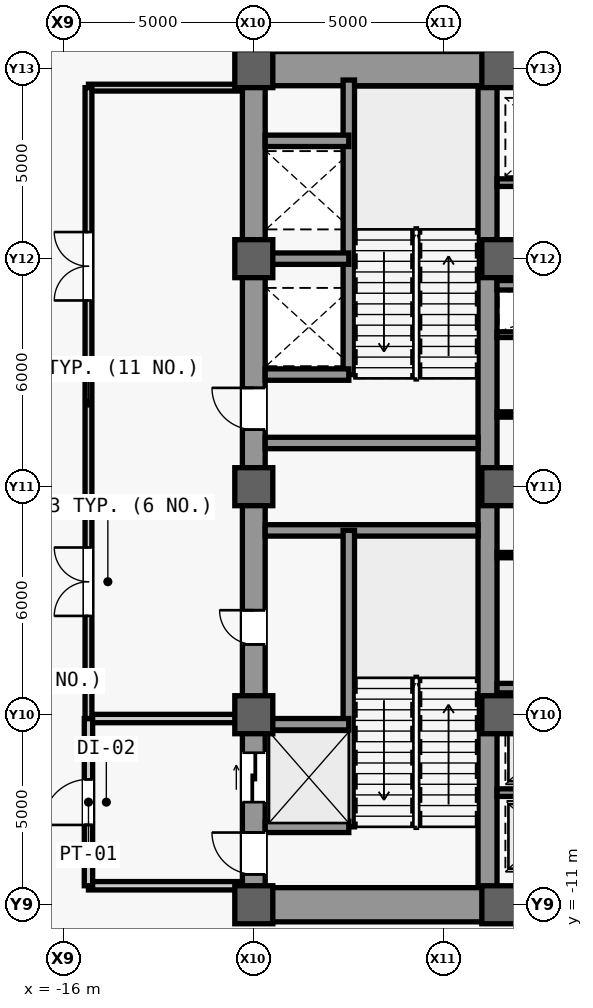
"""IFC4 building model, lengths in metres.
Left out: names, types, materials, properties, quantities, classifications, styles, units other than length and angle.
Written with IfcOpenShell. Run it as: python <this file> out.ifc"""

import sys

from ifc_helpers import new_model, si_unit, direction, frame, frame_2d, origin, origin_2d, place, context, subcontext, project, spatial, rectangle, extrude, source, transform, mapped, element, fill, save


model = new_model("IFC4")
c1 = context("Model", 3, precision=1e-05, world=origin(), true_north=direction((0.0, 1.0)))
c2 = subcontext(c1, "Body", "Model", "MODEL_VIEW")
j1 = project(units=[si_unit("LENGTHUNIT", "METRE"), si_unit("PLANEANGLEUNIT", "RADIAN")], contexts=[c1])
p1 = place(None, origin())
s1 = spatial("IfcSite", under=j1, at=p1, CompositionType="ELEMENT")
p2 = place(p1, origin())
s2 = spatial("IfcBuilding", under=s1, at=p2, CompositionType="ELEMENT")
p3 = place(p2, frame((0.0, 0.0, 12.0)))
s3 = spatial("IfcBuildingStorey", under=s2, at=p3, CompositionType="ELEMENT", Elevation=12.0)
m1 = source(origin(), c2, "Body", "SweptSolid", [
    extrude(rectangle(XDim=22.0, YDim=0.6, at=frame_2d((11.0, 0.0))), origin(), (0.0, 0.0, 1.0), 5.08),
])
p4 = place(p3, frame((-11.0, -11.0, 0.0), z_axis=(0.0, 0.0, 1.0), x_axis=(0.0, 1.0, 0.0)))
e1 = element("IfcWall", 1, at=p4, inside=s3, PredefinedType="SHEAR", context=c2, shape_type="MappedRepresentation", body=[
    mapped(m1, transform((0.0, 0.0, 0.0), scale=1.0)),
])
m2 = source(origin(), c2, "Body", "SweptSolid", [
    extrude(rectangle(XDim=1.1, YDim=2.2, at=frame_2d((0.55, 1.1))), frame((0.0, 0.31, 0.0), z_axis=(0.0, -1.0, 0.0), x_axis=(1.0, 0.0, 0.0)), (0.0, 0.0, 1.0), 0.62),
])
p5 = place(p4, frame((0.8, 0.0, 0.0)))
e2 = element("IfcOpeningElement", 2, at=p5, cuts=e1, PredefinedType="OPENING", context=c2, shape_type="MappedRepresentation", body=[
    mapped(m2, transform((0.0, 0.0, 0.0), scale=1.0)),
])
p6 = place(p4, frame((12.5, 0.0, 0.0)))
e3 = element("IfcOpeningElement", 3, at=p6, cuts=e1, PredefinedType="OPENING", context=c2, shape_type="MappedRepresentation", body=[
    mapped(m2, transform((0.0, 0.0, 0.0), scale=1.0)),
])
m3 = source(origin(), c2, "Body", "SweptSolid", [
    extrude(rectangle(XDim=0.9, YDim=2.15, at=frame_2d((0.45, 1.075))), frame((0.0, 0.31, 0.0), z_axis=(0.0, -1.0, 0.0), x_axis=(1.0, 0.0, 0.0)), (0.0, 0.0, 1.0), 0.62),
])
p7 = place(p4, frame((6.85, 0.0, 0.0)))
e4 = element("IfcOpeningElement", 4, at=p7, cuts=e1, PredefinedType="OPENING", context=c2, shape_type="MappedRepresentation", body=[
    mapped(m3, transform((0.0, 0.0, 0.0), scale=1.0)),
])
m4 = source(origin(), c2, "Body", "SweptSolid", [
    extrude(rectangle(XDim=1.3, YDim=2.3, at=frame_2d((0.65, 1.15))), frame((0.0, 0.31, 0.0), z_axis=(0.0, -1.0, 0.0), x_axis=(1.0, 0.0, 0.0)), (0.0, 0.0, 1.0), 0.62),
])
p8 = place(p4, frame((2.7, 0.0, 0.0)))
e5 = element("IfcOpeningElement", 5, at=p8, cuts=e1, PredefinedType="OPENING", context=c2, shape_type="MappedRepresentation", body=[
    mapped(m4, transform((0.0, 0.0, 0.0), scale=1.0)),
])
m5 = source(origin(), c2, "Body", "SweptSolid", [
    extrude(rectangle(XDim=21.4, YDim=0.5, at=frame_2d((10.7, 0.0))), origin(), (0.0, 0.0, 1.0), 5.08),
])
p9 = place(p3, frame((-4.85, -10.7, 0.0), z_axis=(0.0, 0.0, 1.0), x_axis=(0.0, 1.0, 0.0)))
e6 = element("IfcWall", 6, at=p9, inside=s3, PredefinedType="SHEAR", context=c2, shape_type="MappedRepresentation", body=[
    mapped(m5, transform((0.0, 0.0, 0.0), scale=1.0)),
])
m6 = source(origin(), c2, "Body", "SweptSolid", [
    extrude(rectangle(XDim=5.85, YDim=0.9, at=frame_2d((2.925, 0.0))), origin(), (0.0, 0.0, 1.0), 5.08),
])
for number, where, z_axis, x_axis in (
    (7, (-10.7, -11.0, 0.0), (0.0, 0.0, 1.0), (1.0, 0.0, 0.0)),
    (8, (-10.7, 11.0, 0.0), (0.0, 0.0, 1.0), (1.0, 0.0, 0.0)),
):
    element("IfcWall", number, at=place(p3, frame(where, z_axis=z_axis, x_axis=x_axis)), inside=s3, PredefinedType="SHEAR", context=c2, shape_type="MappedRepresentation", body=[
        mapped(m6, transform((0.0, 0.0, 0.0), scale=1.0)),
    ])
m7 = source(origin(), c2, "Body", "SweptSolid", [
    extrude(rectangle(XDim=5.6, YDim=0.3, at=frame_2d((2.8, 0.0))), origin(), (0.0, 0.0, 1.0), 5.08),
])
for number, where, z_axis, x_axis in (
    (9, (-10.7, -1.15, 0.0), (0.0, 0.0, 1.0), (1.0, 0.0, 0.0)),
    (10, (-10.7, 1.15, 0.0), (0.0, 0.0, 1.0), (1.0, 0.0, 0.0)),
):
    element("IfcWall", number, at=place(p3, frame(where, z_axis=z_axis, x_axis=x_axis)), inside=s3, PredefinedType="SHEAR", context=c2, shape_type="MappedRepresentation", body=[
        mapped(m7, transform((0.0, 0.0, 0.0), scale=1.0)),
    ])
m8 = source(origin(), c2, "Body", "SweptSolid", [
    extrude(rectangle(XDim=9.2, YDim=0.5, at=frame_2d((4.6, 0.0))), origin(), (0.0, 0.0, 1.0), 5.08),
])
p10 = place(p3, frame((-4.6, -11.0, 0.0), z_axis=(0.0, 0.0, 1.0), x_axis=(1.0, 0.0, 0.0)))
e11 = element("IfcWall", 11, at=p10, inside=s3, PredefinedType="SHEAR", context=c2, shape_type="MappedRepresentation", body=[
    mapped(m8, transform((0.0, 0.0, 0.0), scale=1.0)),
])
m9 = source(origin(), c2, "Body", "SweptSolid", [
    extrude(rectangle(XDim=1.8, YDim=2.25, at=frame_2d((0.9, 1.125))), frame((0.0, 0.26, 0.0), z_axis=(0.0, -1.0, 0.0), x_axis=(1.0, 0.0, 0.0)), (0.0, 0.0, 1.0), 0.52),
])
p11 = place(p10, frame((3.7, 0.0, 0.0)))
e12 = element("IfcOpeningElement", 12, at=p11, cuts=e11, PredefinedType="OPENING", context=c2, shape_type="MappedRepresentation", body=[
    mapped(m9, transform((0.0, 0.0, 0.0), scale=1.0)),
])
p12 = place(p3, frame((-4.6, 11.0, 0.0), z_axis=(0.0, 0.0, 1.0), x_axis=(1.0, 0.0, 0.0)))
e13 = element("IfcWall", 13, at=p12, inside=s3, PredefinedType="SHEAR", context=c2, shape_type="MappedRepresentation", body=[
    mapped(m8, transform((0.0, 0.0, 0.0), scale=1.0)),
])
p13 = place(p12, frame((3.7, 0.0, 0.0)))
e14 = element("IfcOpeningElement", 14, at=p13, cuts=e13, PredefinedType="OPENING", context=c2, shape_type="MappedRepresentation", body=[
    mapped(m9, transform((0.0, 0.0, 0.0), scale=1.0)),
])
m10 = source(origin(), c2, "Body", "SweptSolid", [
    extrude(rectangle(XDim=1.0, YDim=1.0, at=origin_2d()), origin(), (0.0, 0.0, 1.0), 5.4),
])
for number, where, z_axis, x_axis in (
    (15, (-11.0, -11.0, 0.0), (0.0, 0.0, 1.0), (1.0, 0.0, 0.0)),
    (16, (-11.0, -6.0, 0.0), (0.0, 0.0, 1.0), (1.0, 0.0, 0.0)),
    (17, (-11.0, 0.0, 0.0), (0.0, 0.0, 1.0), (1.0, 0.0, 0.0)),
    (18, (-11.0, 6.0, 0.0), (0.0, 0.0, 1.0), (1.0, 0.0, 0.0)),
    (19, (-11.0, 11.0, 0.0), (0.0, 0.0, 1.0), (1.0, 0.0, 0.0)),
    (20, (-4.5, -11.0, 0.0), (0.0, 0.0, 1.0), (1.0, 0.0, 0.0)),
    (21, (-4.5, -6.0, 0.0), (0.0, 0.0, 1.0), (1.0, 0.0, 0.0)),
    (22, (-4.5, 0.0, 0.0), (0.0, 0.0, 1.0), (1.0, 0.0, 0.0)),
    (23, (-4.5, 6.0, 0.0), (0.0, 0.0, 1.0), (1.0, 0.0, 0.0)),
    (24, (-4.5, 11.0, 0.0), (0.0, 0.0, 1.0), (1.0, 0.0, 0.0)),
):
    element("IfcColumn", number, at=place(p3, frame(where, z_axis=z_axis, x_axis=x_axis)), inside=s3, PredefinedType="COLUMN", context=c2, shape_type="MappedRepresentation", body=[
        mapped(m10, transform((0.0, 0.0, 0.0), scale=1.0)),
    ])
m11 = source(origin(), c2, "Body", "SweptSolid", [
    extrude(rectangle(XDim=7.8, YDim=0.3, at=frame_2d((3.9, 0.0))), origin(), (0.0, 0.0, 1.0), 5.08),
])
p14 = place(p3, frame((-8.5, -8.95, 0.0), z_axis=(0.0, 0.0, 1.0), x_axis=(0.0, 1.0, 0.0)))
e25 = element("IfcWall", 25, at=p14, inside=s3, PredefinedType="SHEAR", context=c2, shape_type="MappedRepresentation", body=[
    mapped(m11, transform((0.0, 0.0, 0.0), scale=1.0)),
])
m12 = source(origin(), c2, "Body", "SweptSolid", [
    extrude(rectangle(XDim=2.2, YDim=0.3, at=frame_2d((1.1, 0.0))), origin(), (0.0, 0.0, 1.0), 5.08),
])
for number, where, z_axis, x_axis in (
    (26, (-10.7, -8.95, 0.0), (0.0, 0.0, 1.0), (1.0, 0.0, 0.0)),
    (27, (-10.7, -6.25, 0.0), (0.0, 0.0, 1.0), (1.0, 0.0, 0.0)),
):
    element("IfcWall", number, at=place(p3, frame(where, z_axis=z_axis, x_axis=x_axis)), inside=s3, PredefinedType="SHEAR", context=c2, shape_type="MappedRepresentation", body=[
        mapped(m12, transform((0.0, 0.0, 0.0), scale=1.0)),
    ])
m13 = source(origin(), c2, "Body", "SweptSolid", [
    extrude(rectangle(XDim=7.75, YDim=0.3, at=frame_2d((3.875, 0.0))), origin(), (0.0, 0.0, 1.0), 5.08),
])
p15 = place(p3, frame((-8.5, 2.95, 0.0), z_axis=(0.0, 0.0, 1.0), x_axis=(0.0, 1.0, 0.0)))
e28 = element("IfcWall", 28, at=p15, inside=s3, PredefinedType="SHEAR", context=c2, shape_type="MappedRepresentation", body=[
    mapped(m13, transform((0.0, 0.0, 0.0), scale=1.0)),
])
for number, where, z_axis, x_axis in (
    (29, (-10.7, 2.95, 0.0), (0.0, 0.0, 1.0), (1.0, 0.0, 0.0)),
    (30, (-10.7, 6.0, 0.0), (0.0, 0.0, 1.0), (1.0, 0.0, 0.0)),
    (31, (-10.7, 9.1, 0.0), (0.0, 0.0, 1.0), (1.0, 0.0, 0.0)),
):
    element("IfcWall", number, at=place(p3, frame(where, z_axis=z_axis, x_axis=x_axis)), inside=s3, PredefinedType="SHEAR", context=c2, shape_type="MappedRepresentation", body=[
        mapped(m12, transform((0.0, 0.0, 0.0), scale=1.0)),
    ])
m14 = source(origin(), c2, "Body", "SweptSolid", [
    extrude(rectangle(XDim=4.05, YDim=0.22, at=frame_2d((2.025, 0.0))), origin(), (0.0, 0.0, 1.0), 5.08),
])
for number, where, z_axis, x_axis in (
    (32, (-15.35, -10.5, 0.0), (0.0, 0.0, 1.0), (1.0, 0.0, 0.0)),
    (33, (-15.35, -6.1, 0.0), (0.0, 0.0, 1.0), (1.0, 0.0, 0.0)),
):
    element("IfcWall", number, at=place(p3, frame(where, z_axis=z_axis, x_axis=x_axis)), inside=s3, PredefinedType="PARTITIONING", context=c2, shape_type="MappedRepresentation", body=[
        mapped(m14, transform((0.0, 0.0, 0.0), scale=1.0)),
    ])
m15 = source(origin(), c2, "Body", "SweptSolid", [
    extrude(rectangle(XDim=4.4, YDim=0.22, at=frame_2d((2.2, 0.0))), origin(), (0.0, 0.0, 1.0), 5.08),
])
p16 = place(p3, frame((-15.35, -10.5, 0.0), z_axis=(0.0, 0.0, 1.0), x_axis=(0.0, 1.0, 0.0)))
e34 = element("IfcWall", 34, at=p16, inside=s3, PredefinedType="PARTITIONING", context=c2, shape_type="MappedRepresentation", body=[
    mapped(m15, transform((0.0, 0.0, 0.0), scale=1.0)),
])
m16 = source(origin(), c2, "Body", "SweptSolid", [
    extrude(rectangle(XDim=1.2, YDim=2.2, at=frame_2d((0.6, 1.1))), frame((0.0, 0.12, 0.0), z_axis=(0.0, -1.0, 0.0), x_axis=(1.0, 0.0, 0.0)), (0.0, 0.0, 1.0), 0.24),
])
p17 = place(p16, frame((1.6, 0.0, 0.0)))
e35 = element("IfcOpeningElement", 35, at=p17, cuts=e34, PredefinedType="OPENING", context=c2, shape_type="MappedRepresentation", body=[
    mapped(m16, transform((0.0, 0.0, 0.0), scale=1.0)),
])
m17 = source(origin(), c2, "Body", "SweptSolid", [
    extrude(rectangle(XDim=4.05, YDim=0.18, at=frame_2d((2.025, 0.0))), origin(), (0.0, 0.0, 1.0), 5.08),
])
p18 = place(p3, frame((-15.35, 10.5, 0.0), z_axis=(0.0, 0.0, 1.0), x_axis=(1.0, 0.0, 0.0)))
e36 = element("IfcWall", 36, at=p18, inside=s3, PredefinedType="PARTITIONING", context=c2, shape_type="MappedRepresentation", body=[
    mapped(m17, transform((0.0, 0.0, 0.0), scale=1.0)),
])
m18 = source(origin(), c2, "Body", "SweptSolid", [
    extrude(rectangle(XDim=16.6, YDim=0.18, at=frame_2d((8.3, 0.0))), origin(), (0.0, 0.0, 1.0), 5.08),
])
p19 = place(p3, frame((-15.35, -6.1, 0.0), z_axis=(0.0, 0.0, 1.0), x_axis=(0.0, 1.0, 0.0)))
e37 = element("IfcWall", 37, at=p19, inside=s3, PredefinedType="PARTITIONING", context=c2, shape_type="MappedRepresentation", body=[
    mapped(m18, transform((0.0, 0.0, 0.0), scale=1.0)),
])
m19 = source(origin(), c2, "Body", "SweptSolid", [
    extrude(rectangle(XDim=1.8, YDim=2.25, at=frame_2d((0.9, 1.125))), frame((0.0, 0.1, 0.0), z_axis=(0.0, -1.0, 0.0), x_axis=(1.0, 0.0, 0.0)), (0.0, 0.0, 1.0), 0.2),
])
p20 = place(p19, frame((2.7, 0.0, 0.0)))
e38 = element("IfcOpeningElement", 38, at=p20, cuts=e37, PredefinedType="OPENING", context=c2, shape_type="MappedRepresentation", body=[
    mapped(m19, transform((0.0, 0.0, 0.0), scale=1.0)),
])
p21 = place(p19, frame((11.0, 0.0, 0.0)))
e39 = element("IfcOpeningElement", 39, at=p21, cuts=e37, PredefinedType="OPENING", context=c2, shape_type="MappedRepresentation", body=[
    mapped(m19, transform((0.0, 0.0, 0.0), scale=1.0)),
])
m20 = source(origin(), c2, "Body", "SweptSolid", [
    extrude(rectangle(XDim=3.45, YDim=0.15, at=frame_2d((1.725, 0.0))), origin(), (0.0, 0.0, 1.0), 5.08),
])
p22 = place(p3, frame((-4.6, 4.0, 0.0), z_axis=(0.0, 0.0, 1.0), x_axis=(1.0, 0.0, 0.0)))
e40 = element("IfcWall", 40, at=p22, inside=s3, PredefinedType="PARTITIONING", context=c2, shape_type="MappedRepresentation", body=[
    mapped(m20, transform((0.0, 0.0, 0.0), scale=1.0)),
])
m21 = source(origin(), c2, "Body", "SweptSolid", [
    extrude(rectangle(XDim=2.45, YDim=0.2, at=frame_2d((1.225, 0.0))), origin(), (0.0, 0.0, 1.0), 5.08),
])
p23 = place(p3, frame((-4.6, -8.05, 0.0), z_axis=(0.0, 0.0, 1.0), x_axis=(1.0, 0.0, 0.0)))
e41 = element("IfcWall", 41, at=p23, inside=s3, PredefinedType="SHEAR", context=c2, shape_type="MappedRepresentation", body=[
    mapped(m21, transform((0.0, 0.0, 0.0), scale=1.0)),
])
m22 = source(origin(), c2, "Body", "SweptSolid", [
    extrude(rectangle(XDim=9.2, YDim=0.25, at=frame_2d((4.6, 0.0))), origin(), (0.0, 0.0, 1.0), 5.08),
])
p24 = place(p3, frame((-4.6, -5.3, 0.0), z_axis=(0.0, 0.0, 1.0), x_axis=(1.0, 0.0, 0.0)))
e42 = element("IfcWall", 42, at=p24, inside=s3, PredefinedType="SHEAR", context=c2, shape_type="MappedRepresentation", body=[
    mapped(m22, transform((0.0, 0.0, 0.0), scale=1.0)),
])
m23 = source(origin(), c2, "Body", "SweptSolid", [
    extrude(rectangle(XDim=1.05, YDim=2.2, at=frame_2d((0.525, 1.1))), frame((0.0, 0.135, 0.0), z_axis=(0.0, -1.0, 0.0), x_axis=(1.0, 0.0, 0.0)), (0.0, 0.0, 1.0), 0.27),
])
p25 = place(p24, frame((4.075, 0.0, 0.0)))
e43 = element("IfcOpeningElement", 43, at=p25, cuts=e42, PredefinedType="OPENING", context=c2, shape_type="MappedRepresentation", body=[
    mapped(m23, transform((0.0, 0.0, 0.0), scale=1.0)),
])
p26 = place(p3, frame((-4.6, 8.0, 0.0), z_axis=(0.0, 0.0, 1.0), x_axis=(1.0, 0.0, 0.0)))
e44 = element("IfcWall", 44, at=p26, inside=s3, PredefinedType="SHEAR", context=c2, shape_type="MappedRepresentation", body=[
    mapped(m21, transform((0.0, 0.0, 0.0), scale=1.0)),
])
p27 = place(p3, frame((-4.6, 5.3, 0.0), z_axis=(0.0, 0.0, 1.0), x_axis=(1.0, 0.0, 0.0)))
e45 = element("IfcWall", 45, at=p27, inside=s3, PredefinedType="SHEAR", context=c2, shape_type="MappedRepresentation", body=[
    mapped(m22, transform((0.0, 0.0, 0.0), scale=1.0)),
])
p28 = place(p27, frame((4.075, 0.0, 0.0)))
e46 = element("IfcOpeningElement", 46, at=p28, cuts=e45, PredefinedType="OPENING", context=c2, shape_type="MappedRepresentation", body=[
    mapped(m23, transform((0.0, 0.0, 0.0), scale=1.0)),
])
m24 = source(origin(), c2, "Body", "SweptSolid", [
    extrude(rectangle(XDim=3.45, YDim=0.14, at=frame_2d((1.725, 0.0))), origin(), (0.0, 0.0, 1.0), 5.08),
])
for number, where, z_axis, x_axis in (
    (47, (-4.6, -1.8, 0.0), (0.0, 0.0, 1.0), (1.0, 0.0, 0.0)),
    (48, (-4.6, 1.9, 0.0), (0.0, 0.0, 1.0), (1.0, 0.0, 0.0)),
):
    element("IfcWall", number, at=place(p3, frame(where, z_axis=z_axis, x_axis=x_axis)), inside=s3, PredefinedType="PARTITIONING", context=c2, shape_type="MappedRepresentation", body=[
        mapped(m24, transform((0.0, 0.0, 0.0), scale=1.0)),
    ])
m25 = source(origin(), c2, "Body", "SweptSolid", [
    extrude(rectangle(XDim=1.1, YDim=2.2, at=frame_2d((0.55, 1.1))), frame((0.0, 0.025, 0.0), z_axis=(0.0, -1.0, 0.0), x_axis=(1.0, 0.0, 0.0)), (0.0, 0.0, 1.0), 0.05),
])
p29 = place(p5, origin())
e49 = element("IfcDoor", 49, at=p29, inside=s3, OperationType="SINGLE_SWING_RIGHT", PredefinedType="DOOR", context=c2, shape_type="MappedRepresentation", body=[
    mapped(m25, transform((0.0, 0.0, 0.0), scale=1.0)),
])
fill(e2, e49)
p30 = place(p6, origin())
e50 = element("IfcDoor", 50, at=p30, inside=s3, OperationType="SINGLE_SWING_RIGHT", PredefinedType="DOOR", context=c2, shape_type="MappedRepresentation", body=[
    mapped(m25, transform((0.0, 0.0, 0.0), scale=1.0)),
])
fill(e3, e50)
m26 = source(origin(), c2, "Body", "SweptSolid", [
    extrude(rectangle(XDim=0.9, YDim=2.15, at=frame_2d((0.45, 1.075))), frame((0.0, 0.025, 0.0), z_axis=(0.0, -1.0, 0.0), x_axis=(1.0, 0.0, 0.0)), (0.0, 0.0, 1.0), 0.05),
])
p31 = place(p7, origin())
e51 = element("IfcDoor", 51, at=p31, inside=s3, OperationType="SINGLE_SWING_RIGHT", PredefinedType="DOOR", context=c2, shape_type="MappedRepresentation", body=[
    mapped(m26, transform((0.0, 0.0, 0.0), scale=1.0)),
])
fill(e4, e51)
m27 = source(origin(), c2, "Body", "SweptSolid", [
    extrude(rectangle(XDim=1.2, YDim=2.2, at=frame_2d((0.6, 1.1))), frame((0.0, 0.025, 0.0), z_axis=(0.0, -1.0, 0.0), x_axis=(1.0, 0.0, 0.0)), (0.0, 0.0, 1.0), 0.05),
])
p32 = place(p17, origin())
e52 = element("IfcDoor", 52, at=p32, inside=s3, OperationType="SINGLE_SWING_LEFT", PredefinedType="DOOR", context=c2, shape_type="MappedRepresentation", body=[
    mapped(m27, transform((0.0, 0.0, 0.0), scale=1.0)),
])
fill(e35, e52)
m28 = source(origin(), c2, "Body", "SweptSolid", [
    extrude(rectangle(XDim=1.8, YDim=2.25, at=frame_2d((0.9, 1.125))), frame((0.0, 0.025, 0.0), z_axis=(0.0, -1.0, 0.0), x_axis=(1.0, 0.0, 0.0)), (0.0, 0.0, 1.0), 0.05),
])
p33 = place(p20, origin())
e53 = element("IfcDoor", 53, at=p33, inside=s3, OperationType="SINGLE_SWING_LEFT", PredefinedType="DOOR", context=c2, shape_type="MappedRepresentation", body=[
    mapped(m28, transform((0.0, 0.0, 0.0), scale=1.0)),
])
fill(e38, e53)
p34 = place(p21, origin())
e54 = element("IfcDoor", 54, at=p34, inside=s3, OperationType="SINGLE_SWING_RIGHT", PredefinedType="DOOR", context=c2, shape_type="MappedRepresentation", body=[
    mapped(m28, transform((0.0, 0.0, 0.0), scale=1.0)),
])
fill(e39, e54)
m29 = source(origin(), c2, "Body", "SweptSolid", [
    extrude(rectangle(XDim=1.3, YDim=2.3, at=frame_2d((0.65, 1.15))), frame((0.0, 0.025, 0.0), z_axis=(0.0, -1.0, 0.0), x_axis=(1.0, 0.0, 0.0)), (0.0, 0.0, 1.0), 0.05),
])
p35 = place(p8, origin())
e55 = element("IfcDoor", 55, at=p35, inside=s3, OperationType="SLIDING_TO_LEFT", PredefinedType="DOOR", context=c2, shape_type="MappedRepresentation", body=[
    mapped(m29, transform((0.0, 0.0, 0.0), scale=1.0)),
])
fill(e5, e55)
save(model, sys.argv[1])
